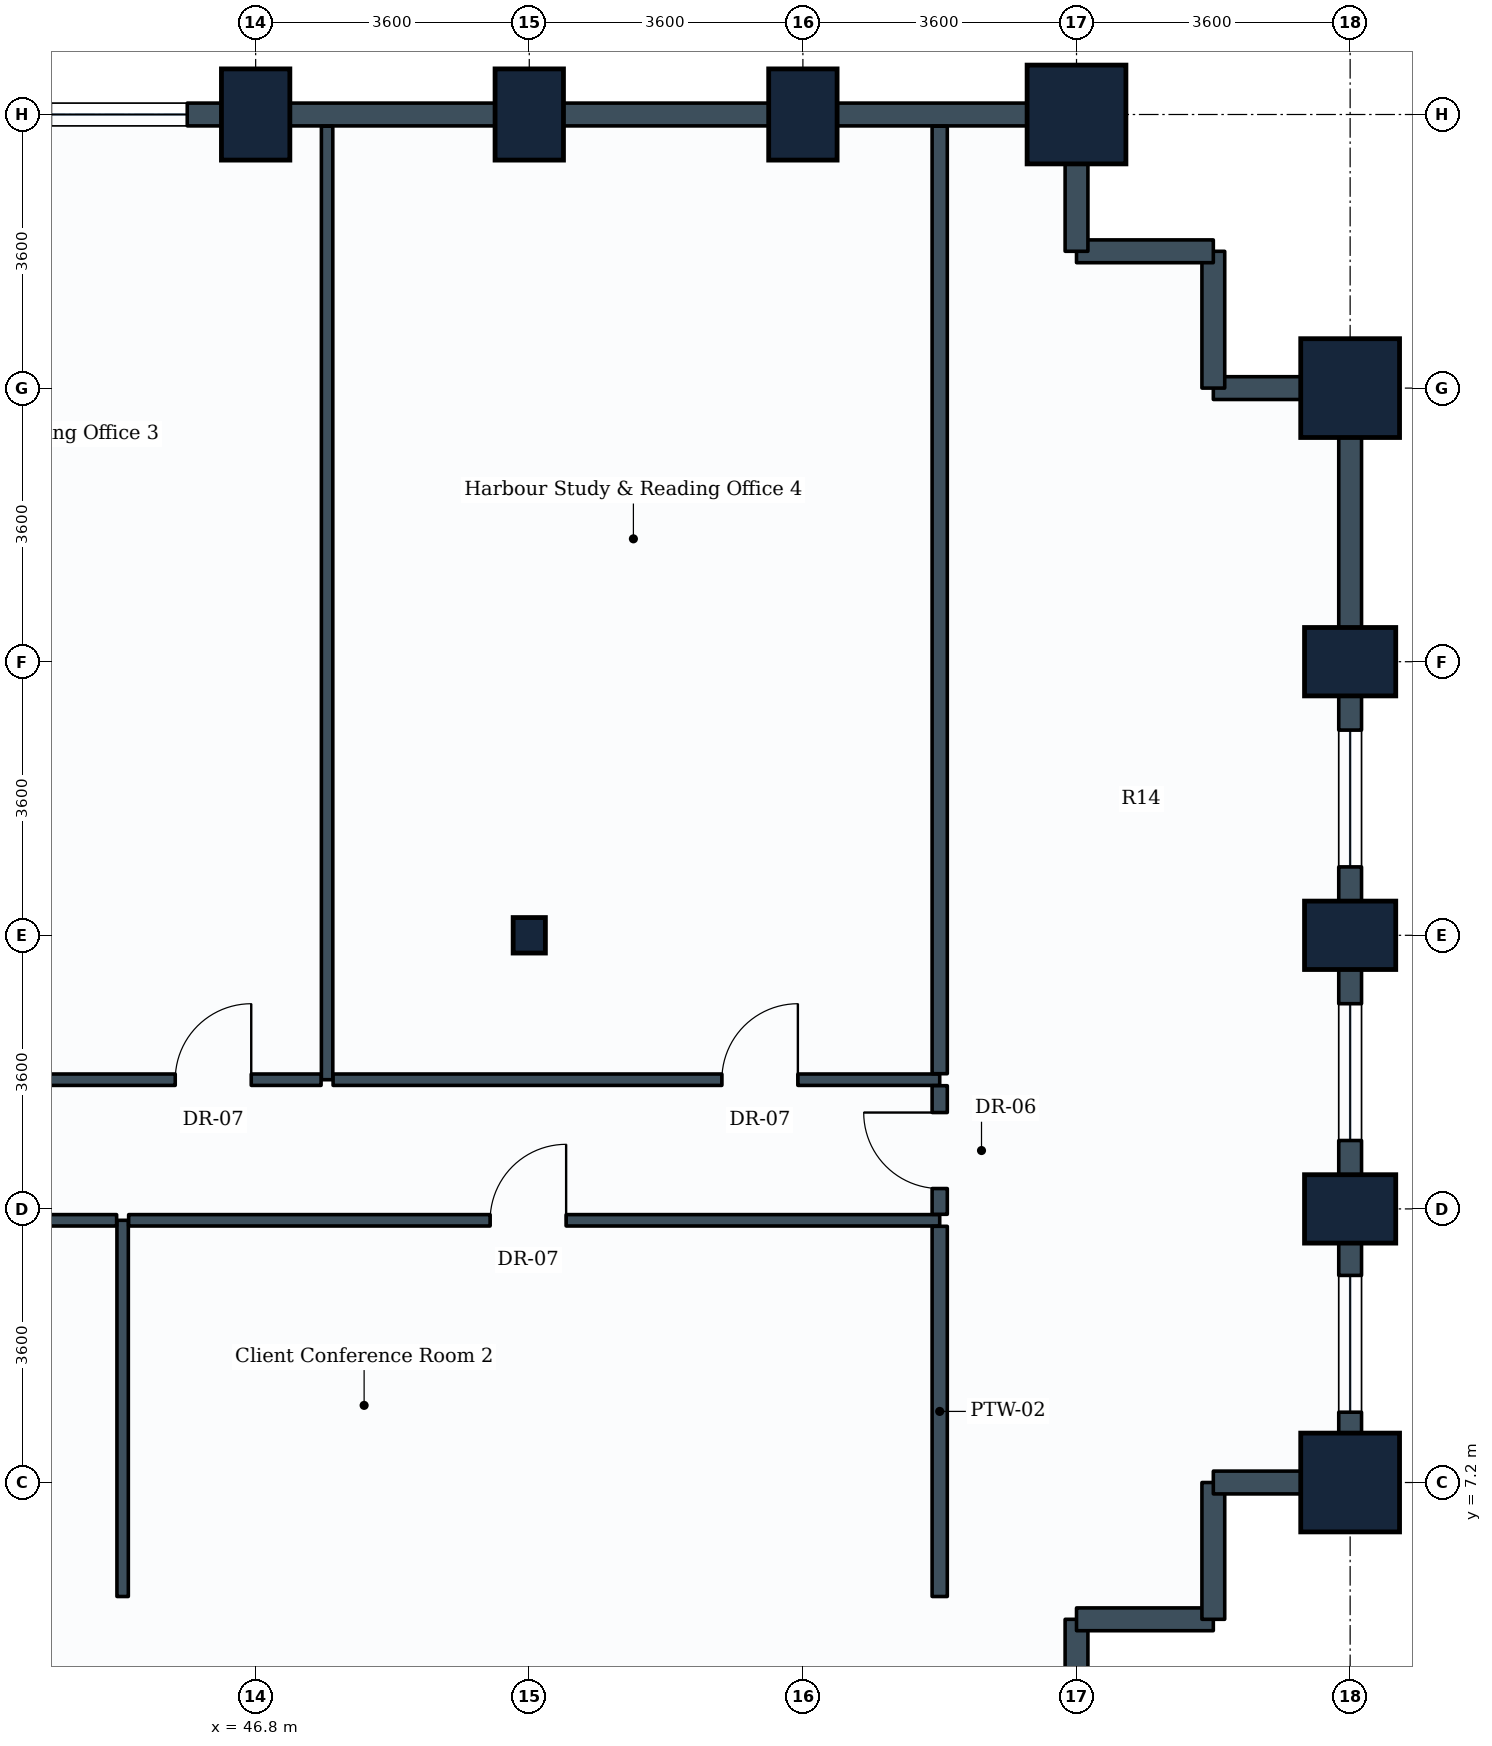
"""IFC4 building model, lengths in metres.
Left out: names, types, materials, properties, quantities, classifications, styles, units other than length and angle.
Written with IfcOpenShell. Run it as: python <this file> out.ifc"""

import sys

from ifc_helpers import new_model, si_unit, direction, frame, frame_2d, origin, origin_2d, place, context, subcontext, project, spatial, rectangle, i_section, extrude, element, fill, save


model = new_model("IFC4")
c1 = context("Model", 3, precision=1e-05, world=origin(), true_north=direction((0.0, 1.0)))
c2 = subcontext(c1, "Body", "Model", "MODEL_VIEW")
j1 = project(units=[si_unit("LENGTHUNIT", "METRE"), si_unit("PLANEANGLEUNIT", "RADIAN")], contexts=[c1])
p1 = place(None, origin())
s1 = spatial("IfcSite", under=j1, at=p1, CompositionType="ELEMENT")
p2 = place(p1, origin())
s2 = spatial("IfcBuilding", under=s1, at=p2, CompositionType="ELEMENT")
p3 = place(p2, frame((0.0, 0.0, 31.8)))
s3 = spatial("IfcBuildingStorey", under=s2, at=p3, CompositionType="ELEMENT", Elevation=31.8)
p4 = place(p3, frame((46.8, 25.2, 0.0), z_axis=(0.0, 0.0, 1.0), x_axis=(1.0, 0.0, 0.0)))
e1 = element("IfcColumn", 1, at=p4, inside=s3, PredefinedType="COLUMN", context=c2, shape_type="SweptSolid", body=[
    extrude(rectangle(XDim=0.9, YDim=1.2, at=origin_2d()), origin(), (0.0, 0.0, 1.0), 3.9),
])
p5 = place(p3, frame((50.4, 14.4, 0.0), z_axis=(0.0, 0.0, 1.0), x_axis=(1.0, 0.0, 0.0)))
e2 = element("IfcColumn", 2, at=p5, inside=s3, PredefinedType="COLUMN", context=c2, shape_type="SweptSolid", body=[
    extrude(i_section(OverallWidth=0.424, OverallDepth=0.467, WebThickness=0.033, FlangeThickness=0.053, FilletRadius=0.015, at=origin_2d()), origin(), (0.0, 0.0, 1.0), 3.9),
])
for number, where, z_axis, x_axis in (
    (3, (50.4, 25.2, 0.0), (0.0, 0.0, 1.0), (1.0, 0.0, 0.0)),
    (4, (54.0, 25.2, 0.0), (0.0, 0.0, 1.0), (1.0, 0.0, 0.0)),
):
    element("IfcColumn", number, at=place(p3, frame(where, z_axis=z_axis, x_axis=x_axis)), inside=s3, PredefinedType="COLUMN", context=c2, shape_type="SweptSolid", body=[
        extrude(rectangle(XDim=0.9, YDim=1.2, at=origin_2d()), origin(), (0.0, 0.0, 1.0), 3.9),
    ])
for number, where, z_axis, x_axis in (
    (5, (57.6, 25.2, 0.0), (0.0, 0.0, 1.0), (1.0, 0.0, 0.0)),
    (6, (61.2, 7.2, 0.0), (0.0, 0.0, 1.0), (1.0, 0.0, 0.0)),
):
    element("IfcColumn", number, at=place(p3, frame(where, z_axis=z_axis, x_axis=x_axis)), inside=s3, PredefinedType="COLUMN", context=c2, shape_type="SweptSolid", body=[
        extrude(rectangle(XDim=1.3, YDim=1.3, at=origin_2d()), origin(), (0.0, 0.0, 1.0), 3.9),
    ])
for number, where, z_axis, x_axis in (
    (7, (61.2, 10.8, 0.0), (0.0, 0.0, 1.0), (0.0, 1.0, 0.0)),
    (8, (61.2, 14.4, 0.0), (0.0, 0.0, 1.0), (0.0, 1.0, 0.0)),
    (9, (61.2, 18.0, 0.0), (0.0, 0.0, 1.0), (0.0, 1.0, 0.0)),
):
    element("IfcColumn", number, at=place(p3, frame(where, z_axis=z_axis, x_axis=x_axis)), inside=s3, PredefinedType="COLUMN", context=c2, shape_type="SweptSolid", body=[
        extrude(rectangle(XDim=0.9, YDim=1.2, at=origin_2d()), origin(), (0.0, 0.0, 1.0), 3.9),
    ])
p6 = place(p3, frame((61.2, 21.6, 0.0), z_axis=(0.0, 0.0, 1.0), x_axis=(0.0, 1.0, 0.0)))
e10 = element("IfcColumn", 10, at=p6, inside=s3, PredefinedType="COLUMN", context=c2, shape_type="SweptSolid", body=[
    extrude(rectangle(XDim=1.3, YDim=1.3, at=origin_2d()), origin(), (0.0, 0.0, 1.0), 3.9),
])
p7 = place(p3, frame((57.6, 5.4, 0.0), z_axis=(0.0, 0.0, 1.0), x_axis=(0.0, -1.0, 0.0)))
e11 = element("IfcWall", 11, at=p7, inside=s3, PredefinedType="STANDARD", context=c2, shape_type="SweptSolid", body=[
    extrude(rectangle(XDim=1.8, YDim=0.3, at=frame_2d((0.9, 0.0))), origin(), (0.0, 0.0, 1.0), 2.93),
])
p8 = place(p3, frame((59.4, 5.4, 0.0), z_axis=(0.0, 0.0, 1.0), x_axis=(-1.0, 0.0, 0.0)))
e12 = element("IfcWall", 12, at=p8, inside=s3, PredefinedType="STANDARD", context=c2, shape_type="SweptSolid", body=[
    extrude(rectangle(XDim=1.8, YDim=0.3, at=frame_2d((0.9, 0.0))), origin(), (0.0, 0.0, 1.0), 3.635),
])
p9 = place(p3, frame((59.4, 7.2, 0.0), z_axis=(0.0, 0.0, 1.0), x_axis=(0.0, -1.0, 0.0)))
e13 = element("IfcWall", 13, at=p9, inside=s3, PredefinedType="STANDARD", context=c2, shape_type="SweptSolid", body=[
    extrude(rectangle(XDim=1.8, YDim=0.3, at=frame_2d((0.9, 0.0))), origin(), (0.0, 0.0, 1.0), 3.635),
])
p10 = place(p3, frame((61.2, 7.2, 0.0), z_axis=(0.0, 0.0, 1.0), x_axis=(-1.0, 0.0, 0.0)))
e14 = element("IfcWall", 14, at=p10, inside=s3, PredefinedType="STANDARD", context=c2, shape_type="SweptSolid", body=[
    extrude(rectangle(XDim=1.8, YDim=0.3, at=frame_2d((0.9, 0.0))), origin(), (0.0, 0.0, 1.0), 2.93),
])
p11 = place(p3, frame((61.2, 10.8, 0.0), z_axis=(0.0, 0.0, 1.0), x_axis=(0.0, -1.0, 0.0)))
e15 = element("IfcWall", 15, at=p11, inside=s3, PredefinedType="STANDARD", context=c2, shape_type="SweptSolid", body=[
    extrude(rectangle(XDim=3.6, YDim=0.3, at=frame_2d((1.8, 0.0))), origin(), (0.0, 0.0, 1.0), 2.93),
])
p12 = place(p11, frame((0.875, 0.0, 0.85)))
e16 = element("IfcOpeningElement", 16, at=p12, cuts=e15, PredefinedType="OPENING", context=c2, shape_type="SweptSolid", body=[
    extrude(rectangle(XDim=1.8, YDim=1.35, at=frame_2d((0.9, 0.675))), frame((0.0, 0.16, 0.0), z_axis=(0.0, -1.0, 0.0), x_axis=(1.0, 0.0, 0.0)), (0.0, 0.0, 1.0), 0.32),
])
p13 = place(p3, frame((61.2, 14.4, 0.0), z_axis=(0.0, 0.0, 1.0), x_axis=(0.0, -1.0, 0.0)))
e17 = element("IfcWall", 17, at=p13, inside=s3, PredefinedType="STANDARD", context=c2, shape_type="SweptSolid", body=[
    extrude(rectangle(XDim=3.6, YDim=0.3, at=frame_2d((1.8, 0.0))), origin(), (0.0, 0.0, 1.0), 2.93),
])
p14 = place(p13, frame((0.9, 0.0, 0.85)))
e18 = element("IfcOpeningElement", 18, at=p14, cuts=e17, PredefinedType="OPENING", context=c2, shape_type="SweptSolid", body=[
    extrude(rectangle(XDim=1.8, YDim=1.35, at=frame_2d((0.9, 0.675))), frame((0.0, 0.16, 0.0), z_axis=(0.0, -1.0, 0.0), x_axis=(1.0, 0.0, 0.0)), (0.0, 0.0, 1.0), 0.32),
])
p15 = place(p3, frame((61.2, 18.0, 0.0), z_axis=(0.0, 0.0, 1.0), x_axis=(0.0, -1.0, 0.0)))
e19 = element("IfcWall", 19, at=p15, inside=s3, PredefinedType="STANDARD", context=c2, shape_type="SweptSolid", body=[
    extrude(rectangle(XDim=3.6, YDim=0.3, at=frame_2d((1.8, 0.0))), origin(), (0.0, 0.0, 1.0), 2.93),
])
p16 = place(p15, frame((0.9, 0.0, 0.85)))
e20 = element("IfcOpeningElement", 20, at=p16, cuts=e19, PredefinedType="OPENING", context=c2, shape_type="SweptSolid", body=[
    extrude(rectangle(XDim=1.8, YDim=1.35, at=frame_2d((0.9, 0.675))), frame((0.0, 0.16, 0.0), z_axis=(0.0, -1.0, 0.0), x_axis=(1.0, 0.0, 0.0)), (0.0, 0.0, 1.0), 0.32),
])
p17 = place(p3, frame((61.2, 21.6, 0.0), z_axis=(0.0, 0.0, 1.0), x_axis=(0.0, -1.0, 0.0)))
e21 = element("IfcWall", 21, at=p17, inside=s3, PredefinedType="STANDARD", context=c2, shape_type="SweptSolid", body=[
    extrude(rectangle(XDim=3.6, YDim=0.3, at=frame_2d((1.8, 0.0))), origin(), (0.0, 0.0, 1.0), 2.93),
])
p18 = place(p3, frame((61.2, 21.6, 0.0), z_axis=(0.0, 0.0, 1.0), x_axis=(-1.0, 0.0, 0.0)))
e22 = element("IfcWall", 22, at=p18, inside=s3, PredefinedType="STANDARD", context=c2, shape_type="SweptSolid", body=[
    extrude(rectangle(XDim=1.8, YDim=0.3, at=frame_2d((0.9, 0.0))), origin(), (0.0, 0.0, 1.0), 2.93),
])
for number, where, z_axis, x_axis in (
    (23, (59.4, 23.4, 0.0), (0.0, 0.0, 1.0), (0.0, -1.0, 0.0)),
    (24, (57.6, 23.4, 0.0), (0.0, 0.0, 1.0), (1.0, 0.0, 0.0)),
):
    element("IfcWall", number, at=place(p3, frame(where, z_axis=z_axis, x_axis=x_axis)), inside=s3, PredefinedType="STANDARD", context=c2, shape_type="SweptSolid", body=[
        extrude(rectangle(XDim=1.8, YDim=0.3, at=frame_2d((0.9, 0.0))), origin(), (0.0, 0.0, 1.0), 3.635),
    ])
p19 = place(p3, frame((57.6, 25.2, 0.0), z_axis=(0.0, 0.0, 1.0), x_axis=(0.0, -1.0, 0.0)))
e25 = element("IfcWall", 25, at=p19, inside=s3, PredefinedType="STANDARD", context=c2, shape_type="SweptSolid", body=[
    extrude(rectangle(XDim=1.8, YDim=0.3, at=frame_2d((0.9, 0.0))), origin(), (0.0, 0.0, 1.0), 2.93),
])
for number, where, z_axis, x_axis in (
    (26, (54.0, 25.2, 0.0), (0.0, 0.0, 1.0), (1.0, 0.0, 0.0)),
    (27, (50.4, 25.2, 0.0), (0.0, 0.0, 1.0), (1.0, 0.0, 0.0)),
):
    element("IfcWall", number, at=place(p3, frame(where, z_axis=z_axis, x_axis=x_axis)), inside=s3, PredefinedType="STANDARD", context=c2, shape_type="SweptSolid", body=[
        extrude(rectangle(XDim=3.6, YDim=0.3, at=frame_2d((1.8, 0.0))), origin(), (0.0, 0.0, 1.0), 2.93),
    ])
p20 = place(p3, frame((46.8, 25.2, 0.0), z_axis=(0.0, 0.0, 1.0), x_axis=(1.0, 0.0, 0.0)))
e28 = element("IfcWall", 28, at=p20, inside=s3, PredefinedType="STANDARD", context=c2, shape_type="SweptSolid", body=[
    extrude(rectangle(XDim=3.6, YDim=0.3, at=frame_2d((1.8, 0.0))), origin(), (0.0, 0.0, 1.0), 2.93),
])
p21 = place(p3, frame((43.2, 25.2, 0.0), z_axis=(0.0, 0.0, 1.0), x_axis=(1.0, 0.0, 0.0)))
e29 = element("IfcWall", 29, at=p21, inside=s3, PredefinedType="STANDARD", context=c2, shape_type="SweptSolid", body=[
    extrude(rectangle(XDim=3.6, YDim=0.3, at=frame_2d((1.8, 0.0))), origin(), (0.0, 0.0, 1.0), 2.93),
])
p22 = place(p21, frame((0.9, 0.0, 0.85)))
e30 = element("IfcOpeningElement", 30, at=p22, cuts=e29, PredefinedType="OPENING", context=c2, shape_type="SweptSolid", body=[
    extrude(rectangle(XDim=1.8, YDim=1.35, at=frame_2d((0.9, 0.675))), frame((0.0, 0.16, 0.0), z_axis=(0.0, -1.0, 0.0), x_axis=(1.0, 0.0, 0.0)), (0.0, 0.0, 1.0), 0.32),
])
p23 = place(p3, frame((45.05, 5.7, 0.0), z_axis=(0.0, 0.0, 1.0), x_axis=(0.0, 1.0, 0.0)))
e31 = element("IfcWall", 31, at=p23, inside=s3, PredefinedType="PARTITIONING", context=c2, shape_type="SweptSolid", body=[
    extrude(rectangle(XDim=4.95, YDim=0.15, at=frame_2d((2.475, 0.0))), origin(), (0.0, 0.0, 1.0), 3.18),
])
p24 = place(p3, frame((34.479, 10.65, 0.0), z_axis=(0.0, 0.0, 1.0), x_axis=(1.0, 0.0, 0.0)))
e32 = element("IfcWall", 32, at=p24, inside=s3, PredefinedType="PARTITIONING", context=c2, shape_type="SweptSolid", body=[
    extrude(rectangle(XDim=10.492, YDim=0.15, at=frame_2d((5.246, 0.0))), origin(), (0.0, 0.0, 1.0), 3.03),
])
p25 = place(p24, frame((4.746, 0.0, 0.0)))
e33 = element("IfcOpeningElement", 33, at=p25, cuts=e32, PredefinedType="OPENING", context=c2, shape_type="SweptSolid", body=[
    extrude(rectangle(XDim=1.0, YDim=2.1, at=frame_2d((0.5, 1.05))), frame((0.0, 0.085, 0.0), z_axis=(0.0, -1.0, 0.0), x_axis=(1.0, 0.0, 0.0)), (0.0, 0.0, 1.0), 0.17),
])
p26 = place(p3, frame((45.129, 10.65, 0.0), z_axis=(0.0, 0.0, 1.0), x_axis=(1.0, 0.0, 0.0)))
e34 = element("IfcWall", 34, at=p26, inside=s3, PredefinedType="PARTITIONING", context=c2, shape_type="SweptSolid", body=[
    extrude(rectangle(XDim=10.671, YDim=0.15, at=frame_2d((5.335, 0.0))), origin(), (0.0, 0.0, 1.0), 3.03),
])
p27 = place(p26, frame((4.756, 0.0, 0.0)))
e35 = element("IfcOpeningElement", 35, at=p27, cuts=e34, PredefinedType="OPENING", context=c2, shape_type="SweptSolid", body=[
    extrude(rectangle(XDim=1.0, YDim=2.1, at=frame_2d((0.5, 1.05))), frame((0.0, 0.085, 0.0), z_axis=(0.0, -1.0, 0.0), x_axis=(1.0, 0.0, 0.0)), (0.0, 0.0, 1.0), 0.17),
])
p28 = place(p3, frame((47.74, 12.5, 0.0), z_axis=(0.0, 0.0, 1.0), x_axis=(0.0, 1.0, 0.0)))
e36 = element("IfcWall", 36, at=p28, inside=s3, PredefinedType="PARTITIONING", context=c2, shape_type="SweptSolid", body=[
    extrude(rectangle(XDim=12.546, YDim=0.15, at=frame_2d((6.273, 0.0))), origin(), (0.0, 0.0, 1.0), 2.93),
])
p29 = place(p3, frame((39.0, 12.5, 0.0), z_axis=(0.0, 0.0, 1.0), x_axis=(1.0, 0.0, 0.0)))
e37 = element("IfcWall", 37, at=p29, inside=s3, PredefinedType="PARTITIONING", context=c2, shape_type="SweptSolid", body=[
    extrude(rectangle(XDim=8.661, YDim=0.15, at=frame_2d((4.331, 0.0))), origin(), (0.0, 0.0, 1.0), 3.04),
])
p30 = place(p29, frame((6.742, 0.0, 0.0)))
e38 = element("IfcOpeningElement", 38, at=p30, cuts=e37, PredefinedType="OPENING", context=c2, shape_type="SweptSolid", body=[
    extrude(rectangle(XDim=1.0, YDim=2.1, at=frame_2d((0.5, 1.05))), frame((0.0, 0.085, 0.0), z_axis=(0.0, -1.0, 0.0), x_axis=(1.0, 0.0, 0.0)), (0.0, 0.0, 1.0), 0.17),
])
p31 = place(p3, frame((47.819, 12.5, 0.0), z_axis=(0.0, 0.0, 1.0), x_axis=(1.0, 0.0, 0.0)))
e39 = element("IfcWall", 39, at=p31, inside=s3, PredefinedType="PARTITIONING", context=c2, shape_type="SweptSolid", body=[
    extrude(rectangle(XDim=7.981, YDim=0.15, at=frame_2d((3.99, 0.0))), origin(), (0.0, 0.0, 1.0), 3.04),
])
p32 = place(p31, frame((5.115, 0.0, 0.0)))
e40 = element("IfcOpeningElement", 40, at=p32, cuts=e39, PredefinedType="OPENING", context=c2, shape_type="SweptSolid", body=[
    extrude(rectangle(XDim=1.0, YDim=2.1, at=frame_2d((0.5, 1.05))), frame((0.0, 0.085, 0.0), z_axis=(0.0, -1.0, 0.0), x_axis=(1.0, 0.0, 0.0)), (0.0, 0.0, 1.0), 0.17),
])
p33 = place(p3, frame((55.8, 5.7, 0.0), z_axis=(0.0, 0.0, 1.0), x_axis=(0.0, 1.0, 0.0)))
e41 = element("IfcWall", 41, at=p33, inside=s3, PredefinedType="PARTITIONING", context=c2, shape_type="SweptSolid", body=[
    extrude(rectangle(XDim=4.871, YDim=0.2, at=frame_2d((2.436, 0.0))), origin(), (0.0, 0.0, 1.0), 3.635),
])
p34 = place(p3, frame((55.8, 12.579, 0.0), z_axis=(0.0, 0.0, 1.0), x_axis=(0.0, 1.0, 0.0)))
e42 = element("IfcWall", 42, at=p34, inside=s3, PredefinedType="PARTITIONING", context=c2, shape_type="SweptSolid", body=[
    extrude(rectangle(XDim=12.467, YDim=0.2, at=frame_2d((6.233, 0.0))), origin(), (0.0, 0.0, 1.0), 2.93),
])
p35 = place(p3, frame((55.8, 10.729, 0.0), z_axis=(0.0, 0.0, 1.0), x_axis=(0.0, 1.0, 0.0)))
e43 = element("IfcWall", 43, at=p35, inside=s3, PredefinedType="PARTITIONING", context=c2, shape_type="SweptSolid", body=[
    extrude(rectangle(XDim=1.692, YDim=0.2, at=frame_2d((0.846, 0.0))), origin(), (0.0, 0.0, 1.0), 3.635),
])
p36 = place(p35, frame((0.339, 0.0, 0.0)))
e44 = element("IfcOpeningElement", 44, at=p36, cuts=e43, PredefinedType="OPENING", context=c2, shape_type="SweptSolid", body=[
    extrude(rectangle(XDim=1.0, YDim=2.1, at=frame_2d((0.5, 1.05))), frame((0.0, 0.11, 0.0), z_axis=(0.0, -1.0, 0.0), x_axis=(1.0, 0.0, 0.0)), (0.0, 0.0, 1.0), 0.22),
])
p37 = place(p12, origin())
e45 = element("IfcWindow", 45, at=p37, inside=s3, PartitioningType="SINGLE_PANEL", PredefinedType="WINDOW", context=c2, shape_type="SweptSolid", body=[
    extrude(rectangle(XDim=1.8, YDim=1.35, at=frame_2d((0.9, 0.675))), frame((0.0, 0.03, 0.0), z_axis=(0.0, -1.0, 0.0), x_axis=(1.0, 0.0, 0.0)), (0.0, 0.0, 1.0), 0.06),
])
fill(e16, e45)
p38 = place(p14, origin())
e46 = element("IfcWindow", 46, at=p38, inside=s3, PartitioningType="SINGLE_PANEL", PredefinedType="WINDOW", context=c2, shape_type="SweptSolid", body=[
    extrude(rectangle(XDim=1.8, YDim=1.35, at=frame_2d((0.9, 0.675))), frame((0.0, 0.03, 0.0), z_axis=(0.0, -1.0, 0.0), x_axis=(1.0, 0.0, 0.0)), (0.0, 0.0, 1.0), 0.06),
])
fill(e18, e46)
p39 = place(p16, origin())
e47 = element("IfcWindow", 47, at=p39, inside=s3, PartitioningType="SINGLE_PANEL", PredefinedType="WINDOW", context=c2, shape_type="SweptSolid", body=[
    extrude(rectangle(XDim=1.8, YDim=1.35, at=frame_2d((0.9, 0.675))), frame((0.0, 0.03, 0.0), z_axis=(0.0, -1.0, 0.0), x_axis=(1.0, 0.0, 0.0)), (0.0, 0.0, 1.0), 0.06),
])
fill(e20, e47)
p40 = place(p22, origin())
e48 = element("IfcWindow", 48, at=p40, inside=s3, PartitioningType="SINGLE_PANEL", PredefinedType="WINDOW", context=c2, shape_type="SweptSolid", body=[
    extrude(rectangle(XDim=1.8, YDim=1.35, at=frame_2d((0.9, 0.675))), frame((0.0, 0.03, 0.0), z_axis=(0.0, -1.0, 0.0), x_axis=(1.0, 0.0, 0.0)), (0.0, 0.0, 1.0), 0.06),
])
fill(e30, e48)
p41 = place(p27, origin())
e49 = element("IfcDoor", 49, at=p41, inside=s3, OperationType="SINGLE_SWING_RIGHT", PredefinedType="DOOR", context=c2, shape_type="SweptSolid", body=[
    extrude(rectangle(XDim=1.0, YDim=2.1, at=frame_2d((0.5, 1.05))), frame((0.0, 0.025, 0.0), z_axis=(0.0, -1.0, 0.0), x_axis=(1.0, 0.0, 0.0)), (0.0, 0.0, 1.0), 0.05),
])
fill(e35, e49)
p42 = place(p30, origin())
e50 = element("IfcDoor", 50, at=p42, inside=s3, OperationType="SINGLE_SWING_RIGHT", PredefinedType="DOOR", context=c2, shape_type="SweptSolid", body=[
    extrude(rectangle(XDim=1.0, YDim=2.1, at=frame_2d((0.5, 1.05))), frame((0.0, 0.025, 0.0), z_axis=(0.0, -1.0, 0.0), x_axis=(1.0, 0.0, 0.0)), (0.0, 0.0, 1.0), 0.05),
])
fill(e38, e50)
p43 = place(p32, origin())
e51 = element("IfcDoor", 51, at=p43, inside=s3, OperationType="SINGLE_SWING_RIGHT", PredefinedType="DOOR", context=c2, shape_type="SweptSolid", body=[
    extrude(rectangle(XDim=1.0, YDim=2.1, at=frame_2d((0.5, 1.05))), frame((0.0, 0.025, 0.0), z_axis=(0.0, -1.0, 0.0), x_axis=(1.0, 0.0, 0.0)), (0.0, 0.0, 1.0), 0.05),
])
fill(e40, e51)
p44 = place(p36, origin())
e52 = element("IfcDoor", 52, at=p44, inside=s3, OperationType="SINGLE_SWING_RIGHT", PredefinedType="DOOR", context=c2, shape_type="SweptSolid", body=[
    extrude(rectangle(XDim=1.0, YDim=2.1, at=frame_2d((0.5, 1.05))), frame((0.0, 0.025, 0.0), z_axis=(0.0, -1.0, 0.0), x_axis=(1.0, 0.0, 0.0)), (0.0, 0.0, 1.0), 0.05),
])
fill(e44, e52)
save(model, sys.argv[1])
